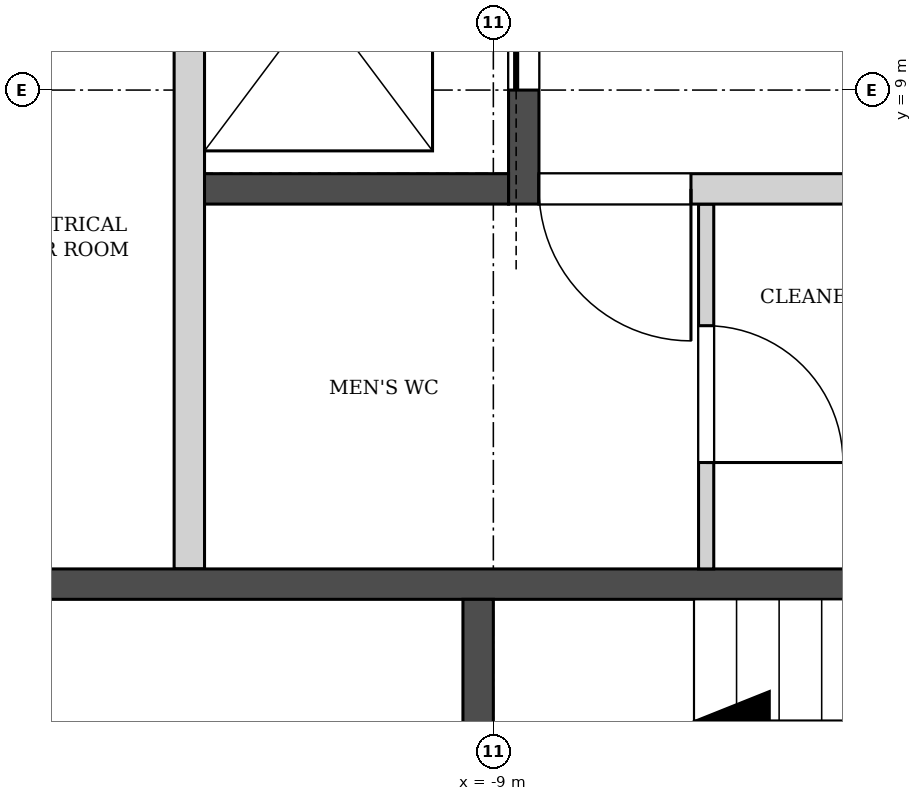
"""IFC4 building model, lengths in metres.
Left out: names, types, materials, properties, quantities, classifications, styles, units other than length and angle.
Written with IfcOpenShell. Run it as: python <this file> out.ifc"""

import sys

from ifc_helpers import new_model, si_unit, direction, frame, frame_2d, origin, place, context, subcontext, project, spatial, rectangle, extrude, element, fill, save


model = new_model("IFC4")
c1 = context("Model", 3, precision=1e-05, world=origin(), true_north=direction((0.0, 1.0)))
c2 = subcontext(c1, "Body", "Model", "MODEL_VIEW")
j1 = project(units=[si_unit("LENGTHUNIT", "METRE"), si_unit("PLANEANGLEUNIT", "RADIAN")], contexts=[c1])
p1 = place(None, origin())
s1 = spatial("IfcSite", under=j1, at=p1, CompositionType="ELEMENT")
p2 = place(p1, origin())
s2 = spatial("IfcBuilding", under=s1, at=p2, CompositionType="ELEMENT")
p3 = place(p2, frame((0.0, 0.0, 25.0)))
s3 = spatial("IfcBuildingStorey", under=s2, at=p3, CompositionType="ELEMENT", Elevation=25.0)
p4 = place(p3, frame((-4.353, 56.207, 0.0), z_axis=(0.0, 0.0, 1.0), x_axis=(-0.500000836325, -0.866024920931, 0.0)))
e1 = element("IfcWall", 1, at=p4, inside=s3, PredefinedType="SOLIDWALL", context=c2, shape_type="SweptSolid", body=[
    extrude(rectangle(XDim=56.0, YDim=0.34, at=frame_2d((28.0, 0.0))), origin(), (0.0, 0.0, 1.0), 4.2),
])
p5 = place(p4, frame((1.5, 0.0, 0.9)))
e2 = element("IfcOpeningElement", 2, at=p5, cuts=e1, PredefinedType="OPENING", context=c2, shape_type="SweptSolid", body=[
    extrude(rectangle(XDim=1.885, YDim=3.0, at=frame_2d((0.942, 1.5))), frame((0.0, 0.18, 0.0), z_axis=(0.0, -1.0, 0.0), x_axis=(1.0, 0.0, 0.0)), (0.0, 0.0, 1.0), 0.36),
])
p6 = place(p4, frame((4.5, 0.0, 0.9)))
e3 = element("IfcOpeningElement", 3, at=p6, cuts=e1, PredefinedType="OPENING", context=c2, shape_type="SweptSolid", body=[
    extrude(rectangle(XDim=1.885, YDim=3.0, at=frame_2d((0.942, 1.5))), frame((0.0, 0.18, 0.0), z_axis=(0.0, -1.0, 0.0), x_axis=(1.0, 0.0, 0.0)), (0.0, 0.0, 1.0), 0.36),
])
p7 = place(p4, frame((7.5, 0.0, 0.9)))
e4 = element("IfcOpeningElement", 4, at=p7, cuts=e1, PredefinedType="OPENING", context=c2, shape_type="SweptSolid", body=[
    extrude(rectangle(XDim=1.885, YDim=3.0, at=frame_2d((0.942, 1.5))), frame((0.0, 0.18, 0.0), z_axis=(0.0, -1.0, 0.0), x_axis=(1.0, 0.0, 0.0)), (0.0, 0.0, 1.0), 0.36),
])
p8 = place(p4, frame((10.5, 0.0, 0.9)))
e5 = element("IfcOpeningElement", 5, at=p8, cuts=e1, PredefinedType="OPENING", context=c2, shape_type="SweptSolid", body=[
    extrude(rectangle(XDim=1.885, YDim=3.0, at=frame_2d((0.942, 1.5))), frame((0.0, 0.18, 0.0), z_axis=(0.0, -1.0, 0.0), x_axis=(1.0, 0.0, 0.0)), (0.0, 0.0, 1.0), 0.36),
])
p9 = place(p4, frame((13.5, 0.0, 0.9)))
e6 = element("IfcOpeningElement", 6, at=p9, cuts=e1, PredefinedType="OPENING", context=c2, shape_type="SweptSolid", body=[
    extrude(rectangle(XDim=1.885, YDim=3.0, at=frame_2d((0.942, 1.5))), frame((0.0, 0.18, 0.0), z_axis=(0.0, -1.0, 0.0), x_axis=(1.0, 0.0, 0.0)), (0.0, 0.0, 1.0), 0.36),
])
p10 = place(p4, frame((16.5, 0.0, 0.9)))
e7 = element("IfcOpeningElement", 7, at=p10, cuts=e1, PredefinedType="OPENING", context=c2, shape_type="SweptSolid", body=[
    extrude(rectangle(XDim=1.885, YDim=3.0, at=frame_2d((0.942, 1.5))), frame((0.0, 0.18, 0.0), z_axis=(0.0, -1.0, 0.0), x_axis=(1.0, 0.0, 0.0)), (0.0, 0.0, 1.0), 0.36),
])
p11 = place(p4, frame((19.5, 0.0, 0.9)))
e8 = element("IfcOpeningElement", 8, at=p11, cuts=e1, PredefinedType="OPENING", context=c2, shape_type="SweptSolid", body=[
    extrude(rectangle(XDim=1.885, YDim=3.0, at=frame_2d((0.942, 1.5))), frame((0.0, 0.18, 0.0), z_axis=(0.0, -1.0, 0.0), x_axis=(1.0, 0.0, 0.0)), (0.0, 0.0, 1.0), 0.36),
])
p12 = place(p4, frame((22.5, 0.0, 0.9)))
e9 = element("IfcOpeningElement", 9, at=p12, cuts=e1, PredefinedType="OPENING", context=c2, shape_type="SweptSolid", body=[
    extrude(rectangle(XDim=1.885, YDim=3.0, at=frame_2d((0.942, 1.5))), frame((0.0, 0.18, 0.0), z_axis=(0.0, -1.0, 0.0), x_axis=(1.0, 0.0, 0.0)), (0.0, 0.0, 1.0), 0.36),
])
p13 = place(p4, frame((25.5, 0.0, 0.0)))
e10 = element("IfcOpeningElement", 10, at=p13, cuts=e1, PredefinedType="OPENING", context=c2, shape_type="SweptSolid", body=[
    extrude(rectangle(XDim=1.885, YDim=2.6, at=frame_2d((0.942, 1.3))), frame((0.0, 0.18, 0.0), z_axis=(0.0, -1.0, 0.0), x_axis=(1.0, 0.0, 0.0)), (0.0, 0.0, 1.0), 0.36),
])
p14 = place(p4, frame((28.5, 0.0, 0.9)))
e11 = element("IfcOpeningElement", 11, at=p14, cuts=e1, PredefinedType="OPENING", context=c2, shape_type="SweptSolid", body=[
    extrude(rectangle(XDim=1.885, YDim=3.0, at=frame_2d((0.942, 1.5))), frame((0.0, 0.18, 0.0), z_axis=(0.0, -1.0, 0.0), x_axis=(1.0, 0.0, 0.0)), (0.0, 0.0, 1.0), 0.36),
])
p15 = place(p4, frame((31.5, 0.0, 0.9)))
e12 = element("IfcOpeningElement", 12, at=p15, cuts=e1, PredefinedType="OPENING", context=c2, shape_type="SweptSolid", body=[
    extrude(rectangle(XDim=1.885, YDim=3.0, at=frame_2d((0.942, 1.5))), frame((0.0, 0.18, 0.0), z_axis=(0.0, -1.0, 0.0), x_axis=(1.0, 0.0, 0.0)), (0.0, 0.0, 1.0), 0.36),
])
p16 = place(p4, frame((34.5, 0.0, 0.9)))
e13 = element("IfcOpeningElement", 13, at=p16, cuts=e1, PredefinedType="OPENING", context=c2, shape_type="SweptSolid", body=[
    extrude(rectangle(XDim=1.885, YDim=3.0, at=frame_2d((0.942, 1.5))), frame((0.0, 0.18, 0.0), z_axis=(0.0, -1.0, 0.0), x_axis=(1.0, 0.0, 0.0)), (0.0, 0.0, 1.0), 0.36),
])
p17 = place(p4, frame((37.5, 0.0, 0.9)))
e14 = element("IfcOpeningElement", 14, at=p17, cuts=e1, PredefinedType="OPENING", context=c2, shape_type="SweptSolid", body=[
    extrude(rectangle(XDim=1.885, YDim=3.0, at=frame_2d((0.942, 1.5))), frame((0.0, 0.18, 0.0), z_axis=(0.0, -1.0, 0.0), x_axis=(1.0, 0.0, 0.0)), (0.0, 0.0, 1.0), 0.36),
])
p18 = place(p4, frame((40.5, 0.0, 0.9)))
e15 = element("IfcOpeningElement", 15, at=p18, cuts=e1, PredefinedType="OPENING", context=c2, shape_type="SweptSolid", body=[
    extrude(rectangle(XDim=1.885, YDim=3.0, at=frame_2d((0.942, 1.5))), frame((0.0, 0.18, 0.0), z_axis=(0.0, -1.0, 0.0), x_axis=(1.0, 0.0, 0.0)), (0.0, 0.0, 1.0), 0.36),
])
p19 = place(p4, frame((43.5, 0.0, 0.9)))
e16 = element("IfcOpeningElement", 16, at=p19, cuts=e1, PredefinedType="OPENING", context=c2, shape_type="SweptSolid", body=[
    extrude(rectangle(XDim=1.885, YDim=3.0, at=frame_2d((0.942, 1.5))), frame((0.0, 0.18, 0.0), z_axis=(0.0, -1.0, 0.0), x_axis=(1.0, 0.0, 0.0)), (0.0, 0.0, 1.0), 0.36),
])
p20 = place(p4, frame((46.5, 0.0, 0.9)))
e17 = element("IfcOpeningElement", 17, at=p20, cuts=e1, PredefinedType="OPENING", context=c2, shape_type="SweptSolid", body=[
    extrude(rectangle(XDim=1.885, YDim=3.0, at=frame_2d((0.942, 1.5))), frame((0.0, 0.18, 0.0), z_axis=(0.0, -1.0, 0.0), x_axis=(1.0, 0.0, 0.0)), (0.0, 0.0, 1.0), 0.36),
])
p21 = place(p4, frame((49.5, 0.0, 0.9)))
e18 = element("IfcOpeningElement", 18, at=p21, cuts=e1, PredefinedType="OPENING", context=c2, shape_type="SweptSolid", body=[
    extrude(rectangle(XDim=1.885, YDim=3.0, at=frame_2d((0.942, 1.5))), frame((0.0, 0.18, 0.0), z_axis=(0.0, -1.0, 0.0), x_axis=(1.0, 0.0, 0.0)), (0.0, 0.0, 1.0), 0.36),
])
p22 = place(p4, frame((52.5, 0.0, 0.9)))
e19 = element("IfcOpeningElement", 19, at=p22, cuts=e1, PredefinedType="OPENING", context=c2, shape_type="SweptSolid", body=[
    extrude(rectangle(XDim=1.885, YDim=3.0, at=frame_2d((0.942, 1.5))), frame((0.0, 0.18, 0.0), z_axis=(0.0, -1.0, 0.0), x_axis=(1.0, 0.0, 0.0)), (0.0, 0.0, 1.0), 0.36),
])
p23 = place(p3, frame((-11.0, 5.85, 0.0), z_axis=(0.0, 0.0, 1.0), x_axis=(0.0, 1.0, 0.0)))
e20 = element("IfcWall", 20, at=p23, inside=s3, PredefinedType="SOLIDWALL", context=c2, shape_type="SweptSolid", body=[
    extrude(rectangle(XDim=7.4, YDim=0.2, at=frame_2d((3.7, 0.0))), origin(), (0.0, 0.0, 1.0), 4.2),
])
p24 = place(p3, frame((-8.8, 8.25, -2.0), z_axis=(0.0, 0.0, 1.0), x_axis=(0.0, 1.0, 0.0)))
e21 = element("IfcWall", 21, at=p24, inside=s3, PredefinedType="SOLIDWALL", context=c2, shape_type="SweptSolid", body=[
    extrude(rectangle(XDim=5.2, YDim=0.2, at=frame_2d((2.6, 0.0))), origin(), (0.0, 0.0, 1.0), 6.2),
])
p25 = place(p24, frame((0.75, 0.0, 2.0)))
e22 = element("IfcOpeningElement", 22, at=p25, cuts=e21, PredefinedType="OPENING", context=c2, shape_type="SweptSolid", body=[
    extrude(rectangle(XDim=1.2, YDim=2.1, at=frame_2d((0.6, 1.05))), frame((0.0, 0.11, 0.0), z_axis=(0.0, -1.0, 0.0), x_axis=(1.0, 0.0, 0.0)), (0.0, 0.0, 1.0), 0.22),
])
p26 = place(p24, frame((3.25, 0.0, 2.0)))
e23 = element("IfcOpeningElement", 23, at=p26, cuts=e21, PredefinedType="OPENING", context=c2, shape_type="SweptSolid", body=[
    extrude(rectangle(XDim=1.2, YDim=2.1, at=frame_2d((0.6, 1.05))), frame((0.0, 0.11, 0.0), z_axis=(0.0, -1.0, 0.0), x_axis=(1.0, 0.0, 0.0)), (0.0, 0.0, 1.0), 0.22),
])
p27 = place(p3, frame((-10.9, 8.35, -2.0), z_axis=(0.0, 0.0, 1.0), x_axis=(1.0, 0.0, 0.0)))
e24 = element("IfcWall", 24, at=p27, inside=s3, PredefinedType="SOLIDWALL", context=c2, shape_type="SweptSolid", body=[
    extrude(rectangle(XDim=2.0, YDim=0.2, at=frame_2d((1.0, 0.0))), origin(), (0.0, 0.0, 1.0), 6.2),
])
p28 = place(p3, frame((-12.6, 5.75, -2.0), z_axis=(0.0, 0.0, 1.0), x_axis=(1.0, 0.0, 0.0)))
e25 = element("IfcWall", 25, at=p28, inside=s3, PredefinedType="SOLIDWALL", context=c2, shape_type="SweptSolid", body=[
    extrude(rectangle(XDim=11.4, YDim=0.2, at=frame_2d((5.7, 0.0))), origin(), (0.0, 0.0, 1.0), 6.2),
])
p29 = place(p3, frame((-9.1, 2.25, -2.0), z_axis=(0.0, 0.0, 1.0), x_axis=(0.0, 1.0, 0.0)))
e26 = element("IfcWall", 26, at=p29, inside=s3, PredefinedType="SOLIDWALL", context=c2, shape_type="SweptSolid", body=[
    extrude(rectangle(XDim=3.4, YDim=0.2, at=frame_2d((1.7, 0.0))), origin(), (0.0, 0.0, 1.0), 6.2),
])
p30 = place(p29, frame((0.2, 0.0, 2.0)))
e27 = element("IfcOpeningElement", 27, at=p30, cuts=e26, PredefinedType="OPENING", context=c2, shape_type="SweptSolid", body=[
    extrude(rectangle(XDim=1.2, YDim=2.1, at=frame_2d((0.6, 1.05))), frame((0.0, 0.11, 0.0), z_axis=(0.0, -1.0, 0.0), x_axis=(1.0, 0.0, 0.0)), (0.0, 0.0, 1.0), 0.22),
])
p31 = place(p3, frame((-7.6, 5.85, 0.0), z_axis=(0.0, 0.0, 1.0), x_axis=(0.0, 1.0, 0.0)))
e28 = element("IfcWall", 28, at=p31, inside=s3, PredefinedType="PARTITIONING", context=c2, shape_type="SweptSolid", body=[
    extrude(rectangle(XDim=2.4, YDim=0.1, at=frame_2d((1.2, 0.0))), origin(), (0.0, 0.0, 1.0), 4.2),
])
p32 = place(p31, frame((0.7, 0.0, 0.0)))
e29 = element("IfcOpeningElement", 29, at=p32, cuts=e28, PredefinedType="OPENING", context=c2, shape_type="SweptSolid", body=[
    extrude(rectangle(XDim=0.9, YDim=2.1, at=frame_2d((0.45, 1.05))), frame((0.0, 0.06, 0.0), z_axis=(0.0, -1.0, 0.0), x_axis=(1.0, 0.0, 0.0)), (0.0, 0.0, 1.0), 0.12),
])
p33 = place(p3, frame((-8.7, 8.35, 0.0), z_axis=(0.0, 0.0, 1.0), x_axis=(1.0, 0.0, 0.0)))
e30 = element("IfcWall", 30, at=p33, inside=s3, PredefinedType="SOLIDWALL", context=c2, shape_type="SweptSolid", body=[
    extrude(rectangle(XDim=2.8, YDim=0.2, at=frame_2d((1.4, 0.0))), origin(), (0.0, 0.0, 1.0), 4.2),
])
p34 = place(p33, origin())
e31 = element("IfcOpeningElement", 31, at=p34, cuts=e30, PredefinedType="OPENING", context=c2, shape_type="SweptSolid", body=[
    extrude(rectangle(XDim=1.0, YDim=2.1, at=frame_2d((0.5, 1.05))), frame((0.0, 0.11, 0.0), z_axis=(0.0, -1.0, 0.0), x_axis=(1.0, 0.0, 0.0)), (0.0, 0.0, 1.0), 0.22),
])
p35 = place(p25, origin())
e32 = element("IfcDoor", 32, at=p35, inside=s3, OperationType="SLIDING_TO_LEFT", PredefinedType="DOOR", context=c2, shape_type="SweptSolid", body=[
    extrude(rectangle(XDim=1.2, YDim=2.1, at=frame_2d((0.6, 1.05))), frame((0.0, 0.025, 0.0), z_axis=(0.0, -1.0, 0.0), x_axis=(1.0, 0.0, 0.0)), (0.0, 0.0, 1.0), 0.05),
])
fill(e22, e32)
p36 = place(p34, frame((1.0, 0.0, 0.0), z_axis=(0.0, 0.0, 1.0), x_axis=(-1.0, 0.0, 0.0)))
e33 = element("IfcDoor", 33, at=p36, inside=s3, OperationType="SINGLE_SWING_LEFT", PredefinedType="DOOR", context=c2, shape_type="SweptSolid", body=[
    extrude(rectangle(XDim=1.0, YDim=2.1, at=frame_2d((0.5, 1.05))), frame((0.0, 0.025, 0.0), z_axis=(0.0, -1.0, 0.0), x_axis=(1.0, 0.0, 0.0)), (0.0, 0.0, 1.0), 0.05),
])
fill(e31, e33)
p37 = place(p32, frame((0.9, 0.0, 0.0), z_axis=(0.0, 0.0, 1.0), x_axis=(-1.0, 0.0, 0.0)))
e34 = element("IfcDoor", 34, at=p37, inside=s3, OperationType="SINGLE_SWING_RIGHT", PredefinedType="DOOR", context=c2, shape_type="SweptSolid", body=[
    extrude(rectangle(XDim=0.9, YDim=2.1, at=frame_2d((0.45, 1.05))), frame((0.0, 0.025, 0.0), z_axis=(0.0, -1.0, 0.0), x_axis=(1.0, 0.0, 0.0)), (0.0, 0.0, 1.0), 0.05),
])
fill(e29, e34)
save(model, sys.argv[1])
